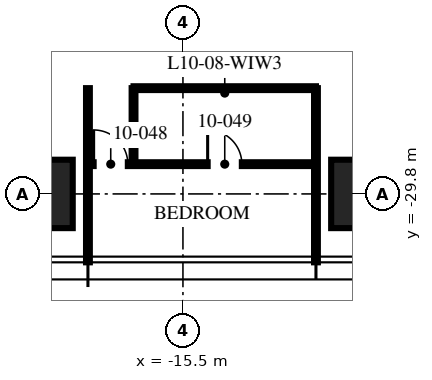
"""IFC4 building model, lengths in metres.
Left out: names, types, materials, properties, quantities, classifications, styles, units other than length and angle.
Written with IfcOpenShell. Run it as: python <this file> out.ifc"""

import sys

from ifc_helpers import new_model, si_unit, direction, frame, frame_2d, origin, origin_2d, place, context, subcontext, project, spatial, rectangle, hollow_rectangle, extrude, element, fill, save


model = new_model("IFC4")
c1 = context("Model", 3, precision=1e-05, world=origin(), true_north=direction((0.0, 1.0)))
c2 = subcontext(c1, "Body", "Model", "MODEL_VIEW")
j1 = project(units=[si_unit("LENGTHUNIT", "METRE"), si_unit("PLANEANGLEUNIT", "RADIAN")], contexts=[c1])
p1 = place(None, origin())
s1 = spatial("IfcSite", under=j1, at=p1, CompositionType="ELEMENT")
p2 = place(p1, origin())
s2 = spatial("IfcBuilding", under=s1, at=p2, CompositionType="ELEMENT")
p3 = place(p2, frame((0.0, 0.0, 43.5)))
s3 = spatial("IfcBuildingStorey", under=s2, at=p3, CompositionType="ELEMENT", Elevation=43.5)
for number, where, z_axis, x_axis in (
    (1, (-10.0, -29.8, 0.0), (0.0, 0.0, 1.0), (1.0, 0.0, 0.0)),
    (2, (-20.0, -29.8, 0.0), (0.0, 0.0, 1.0), (1.0, 0.0, 0.0)),
):
    element("IfcColumn", number, at=place(p3, frame(where, z_axis=z_axis, x_axis=x_axis)), inside=s3, PredefinedType="COLUMN", context=c2, shape_type="SweptSolid", body=[
        extrude(hollow_rectangle(XDim=3.2, YDim=1.8, WallThickness=0.2, at=origin_2d()), origin(), (0.0, 0.0, 1.0), 3.75),
    ])
for number, where, z_axis, x_axis in (
    (3, (-18.0, -27.017, 0.0), (0.0, 0.0, 1.0), (0.0, -1.0, 0.0)),
    (4, (-12.0, -27.017, 0.0), (0.0, 0.0, 1.0), (0.0, -1.0, 0.0)),
):
    element("IfcWall", number, at=place(p3, frame(where, z_axis=z_axis, x_axis=x_axis)), inside=s3, PredefinedType="PARTITIONING", context=c2, shape_type="SweptSolid", body=[
        extrude(rectangle(XDim=4.583, YDim=0.1, at=frame_2d((2.292, 0.0))), origin(), (0.0, 0.0, 1.0), 2.71),
    ])
p4 = place(p3, frame((-18.0, -29.017, 0.0), z_axis=(0.0, 0.0, 1.0), x_axis=(1.0, 0.0, 0.0)))
e5 = element("IfcWall", 5, at=p4, inside=s3, PredefinedType="PARTITIONING", context=c2, shape_type="SweptSolid", body=[
    extrude(rectangle(XDim=6.0, YDim=0.1, at=frame_2d((3.0, 0.0))), origin(), (0.0, 0.0, 1.0), 2.61),
])
p5 = place(p4, frame((0.15, 0.0, 0.0)))
e6 = element("IfcOpeningElement", 6, at=p5, cuts=e5, PredefinedType="OPENING", context=c2, shape_type="SweptSolid", body=[
    extrude(rectangle(XDim=0.9, YDim=2.1, at=frame_2d((0.45, 1.05))), frame((0.0, 0.06, 0.0), z_axis=(0.0, -1.0, 0.0), x_axis=(1.0, 0.0, 0.0)), (0.0, 0.0, 1.0), 0.12),
])
p6 = place(p4, frame((3.15, 0.0, 0.0)))
e7 = element("IfcOpeningElement", 7, at=p6, cuts=e5, PredefinedType="OPENING", context=c2, shape_type="SweptSolid", body=[
    extrude(rectangle(XDim=0.9, YDim=2.1, at=frame_2d((0.45, 1.05))), frame((0.0, 0.06, 0.0), z_axis=(0.0, -1.0, 0.0), x_axis=(1.0, 0.0, 0.0)), (0.0, 0.0, 1.0), 0.12),
])
p7 = place(p3, frame((-16.8, -27.017, 0.0), z_axis=(0.0, 0.0, 1.0), x_axis=(0.0, -1.0, 0.0)))
e8 = element("IfcWall", 8, at=p7, inside=s3, PredefinedType="PARTITIONING", context=c2, shape_type="SweptSolid", body=[
    extrude(rectangle(XDim=2.0, YDim=0.1, at=frame_2d((1.0, 0.0))), origin(), (0.0, 0.0, 1.0), 3.5),
])
p8 = place(p3, frame((-16.8, -27.017, 0.0), z_axis=(0.0, 0.0, 1.0), x_axis=(1.0, 0.0, 0.0)))
e9 = element("IfcWall", 9, at=p8, inside=s3, PredefinedType="PARTITIONING", context=c2, shape_type="SweptSolid", body=[
    extrude(rectangle(XDim=4.8, YDim=0.1, at=frame_2d((2.4, 0.0))), origin(), (0.0, 0.0, 1.0), 2.61),
])
p9 = place(p5, origin())
e10 = element("IfcDoor", 10, at=p9, inside=s3, OperationType="SINGLE_SWING_LEFT", PredefinedType="DOOR", context=c2, shape_type="SweptSolid", body=[
    extrude(rectangle(XDim=0.9, YDim=2.1, at=frame_2d((0.45, 1.05))), frame((0.0, 0.025, 0.0), z_axis=(0.0, -1.0, 0.0), x_axis=(1.0, 0.0, 0.0)), (0.0, 0.0, 1.0), 0.05),
])
fill(e6, e10)
p10 = place(p6, origin())
e11 = element("IfcDoor", 11, at=p10, inside=s3, OperationType="SINGLE_SWING_LEFT", PredefinedType="DOOR", context=c2, shape_type="SweptSolid", body=[
    extrude(rectangle(XDim=0.9, YDim=2.1, at=frame_2d((0.45, 1.05))), frame((0.0, 0.025, 0.0), z_axis=(0.0, -1.0, 0.0), x_axis=(1.0, 0.0, 0.0)), (0.0, 0.0, 1.0), 0.05),
])
fill(e7, e11)
save(model, sys.argv[1])
